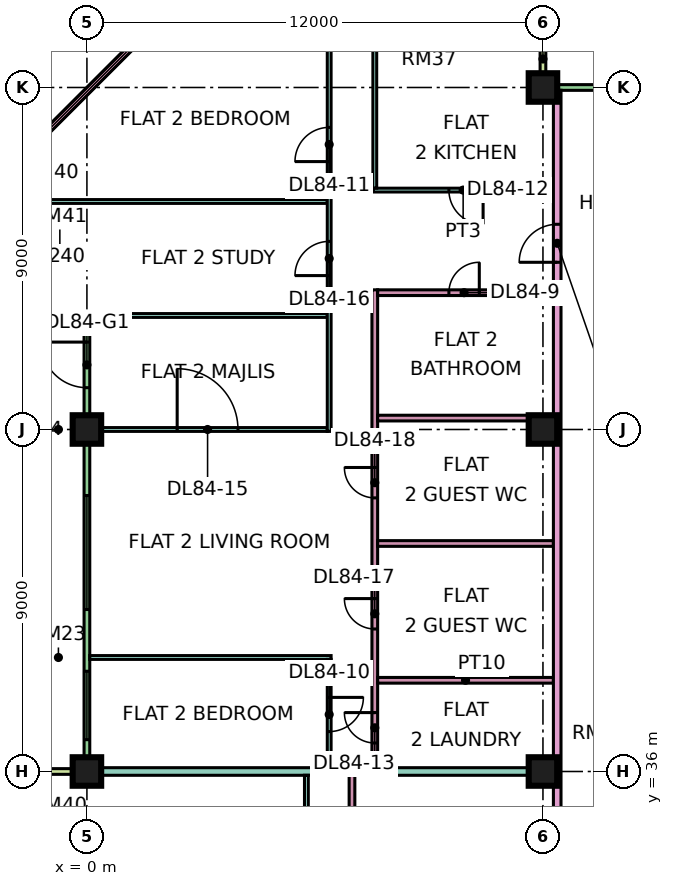
"""IFC4 building model, lengths in metres.
Left out: names, types, materials, properties, quantities, classifications, styles, units other than length and angle.
Written with IfcOpenShell. Run it as: python <this file> out.ifc"""

import sys

from ifc_helpers import new_model, si_unit, direction, frame, frame_2d, origin, origin_2d, place, context, subcontext, project, spatial, rectangle, extrude, element, fill, save


model = new_model("IFC4")
c1 = context("Model", 3, precision=1e-05, world=origin(), true_north=direction((0.0, 1.0)))
c2 = subcontext(c1, "Body", "Model", "MODEL_VIEW")
j1 = project(units=[si_unit("LENGTHUNIT", "METRE"), si_unit("PLANEANGLEUNIT", "RADIAN")], contexts=[c1])
p1 = place(None, origin())
s1 = spatial("IfcSite", under=j1, at=p1, CompositionType="ELEMENT")
p2 = place(p1, origin())
s2 = spatial("IfcBuilding", under=s1, at=p2, CompositionType="ELEMENT")
p3 = place(p2, frame((0.0, 0.0, 361.4)))
s3 = spatial("IfcBuildingStorey", under=s2, at=p3, CompositionType="ELEMENT", Elevation=361.4)
p4 = place(p3, frame((0.0, 36.0, 0.0), z_axis=(0.0, 0.0, 1.0), x_axis=(1.0, 0.0, 0.0)))
e1 = element("IfcColumn", 1, at=p4, inside=s3, PredefinedType="COLUMN", context=c2, shape_type="SweptSolid", body=[
    extrude(rectangle(XDim=0.75, YDim=0.75, at=origin_2d()), origin(), (0.0, 0.0, 1.0), 3.75),
])
for number, where, z_axis, x_axis in (
    (2, (0.0, 45.0, 0.0), (0.0, 0.0, 1.0), (1.0, 0.0, 0.0)),
    (3, (12.0, 36.0, 0.0), (0.0, 0.0, 1.0), (1.0, 0.0, 0.0)),
    (4, (12.0, 45.0, 0.0), (0.0, 0.0, 1.0), (1.0, 0.0, 0.0)),
    (5, (12.0, 54.0, 0.0), (0.0, 0.0, 1.0), (1.0, 0.0, 0.0)),
):
    element("IfcColumn", number, at=place(p3, frame(where, z_axis=z_axis, x_axis=x_axis)), inside=s3, PredefinedType="COLUMN", context=c2, shape_type="SweptSolid", body=[
        extrude(rectangle(XDim=0.75, YDim=0.75, at=origin_2d()), origin(), (0.0, 0.0, 1.0), 3.75),
    ])
p5 = place(p3, frame((22.425, 54.0, 0.0), z_axis=(0.0, 0.0, 1.0), x_axis=(-1.0, 0.0, 0.0)))
e6 = element("IfcWall", 6, at=p5, inside=s3, PredefinedType="SOLIDWALL", context=c2, shape_type="SweptSolid", body=[
    extrude(rectangle(XDim=10.35, YDim=0.15, at=frame_2d((5.175, 0.0))), origin(), (0.0, 0.0, 1.0), 3.35),
])
p6 = place(p5, frame((1.012, 0.0, 0.45)))
e7 = element("IfcOpeningElement", 7, at=p6, cuts=e6, PredefinedType="OPENING", context=c2, shape_type="SweptSolid", body=[
    extrude(rectangle(XDim=4.8, YDim=2.4, at=frame_2d((2.4, 1.2))), frame((0.0, 0.085, 0.0), z_axis=(0.0, -1.0, 0.0), x_axis=(1.0, 0.0, 0.0)), (0.0, 0.0, 1.0), 0.17),
])
p7 = place(p3, frame((12.0, 55.5, 0.0), z_axis=(0.0, 0.0, 1.0), x_axis=(0.0, -1.0, 0.0)))
e8 = element("IfcWall", 8, at=p7, inside=s3, PredefinedType="SOLIDWALL", context=c2, shape_type="SweptSolid", body=[
    extrude(rectangle(XDim=1.5, YDim=0.15, at=frame_2d((0.75, 0.0))), origin(), (0.0, 0.0, 1.0), 3.35),
])
p8 = place(p3, frame((1.553, 55.447, 0.0), z_axis=(0.0, 0.0, 1.0), x_axis=(-0.707106781187, -0.707106781187, 0.0)))
e9 = element("IfcWall", 9, at=p8, inside=s3, PredefinedType="SOLIDWALL", context=c2, shape_type="SweptSolid", body=[
    extrude(rectangle(XDim=4.243, YDim=0.15, at=frame_2d((2.121, 0.0))), origin(), (0.0, 0.0, 1.0), 3.35),
])
p9 = place(p8, frame((0.621, 0.0, 0.45)))
e10 = element("IfcOpeningElement", 10, at=p9, cuts=e9, PredefinedType="OPENING", context=c2, shape_type="SweptSolid", body=[
    extrude(rectangle(XDim=3.0, YDim=2.4, at=frame_2d((1.5, 1.2))), frame((0.0, 0.085, 0.0), z_axis=(0.0, -1.0, 0.0), x_axis=(1.0, 0.0, 0.0)), (0.0, 0.0, 1.0), 0.17),
])
p10 = place(p3, frame((0.0, 47.925, 0.0), z_axis=(0.0, 0.0, 1.0), x_axis=(0.0, -1.0, 0.0)))
e11 = element("IfcWall", 11, at=p10, inside=s3, PredefinedType="SOLIDWALL", context=c2, shape_type="SweptSolid", body=[
    extrude(rectangle(XDim=11.85, YDim=0.15, at=frame_2d((5.925, 0.0))), origin(), (0.0, 0.0, 1.0), 3.35),
])
p11 = place(p10, frame((0.625, 0.0, 0.0)))
e12 = element("IfcOpeningElement", 12, at=p11, cuts=e11, PredefinedType="OPENING", context=c2, shape_type="SweptSolid", body=[
    extrude(rectangle(XDim=1.2, YDim=2.4, at=frame_2d((0.6, 1.2))), frame((0.0, 0.085, 0.0), z_axis=(0.0, -1.0, 0.0), x_axis=(1.0, 0.0, 0.0)), (0.0, 0.0, 1.0), 0.17),
])
p12 = place(p10, frame((4.663, 0.0, 0.45)))
e13 = element("IfcOpeningElement", 13, at=p12, cuts=e11, PredefinedType="OPENING", context=c2, shape_type="SweptSolid", body=[
    extrude(rectangle(XDim=3.0, YDim=2.4, at=frame_2d((1.5, 1.2))), frame((0.0, 0.085, 0.0), z_axis=(0.0, -1.0, 0.0), x_axis=(1.0, 0.0, 0.0)), (0.0, 0.0, 1.0), 0.17),
])
p13 = place(p10, frame((9.288, 0.0, 0.45)))
e14 = element("IfcOpeningElement", 14, at=p13, cuts=e11, PredefinedType="OPENING", context=c2, shape_type="SweptSolid", body=[
    extrude(rectangle(XDim=1.8, YDim=2.4, at=frame_2d((0.9, 1.2))), frame((0.0, 0.085, 0.0), z_axis=(0.0, -1.0, 0.0), x_axis=(1.0, 0.0, 0.0)), (0.0, 0.0, 1.0), 0.17),
])
for number, where, z_axis, x_axis in (
    (15, (-1.5, 48.0, 0.0), (0.0, 0.0, 1.0), (1.0, 0.0, 0.0)),
    (16, (-1.5, 36.0, 0.0), (0.0, 0.0, 1.0), (1.0, 0.0, 0.0)),
):
    element("IfcWall", number, at=place(p3, frame(where, z_axis=z_axis, x_axis=x_axis)), inside=s3, PredefinedType="SOLIDWALL", context=c2, shape_type="SweptSolid", body=[
        extrude(rectangle(XDim=1.5, YDim=0.15, at=frame_2d((0.75, 0.0))), origin(), (0.0, 0.0, 1.0), 3.35),
    ])
e17 = element("IfcWall", 17, at=p4, inside=s3, PredefinedType="PARTITIONING", context=c2, shape_type="SweptSolid", body=[
    extrude(rectangle(XDim=12.275, YDim=0.2, at=frame_2d((6.137, 0.0))), origin(), (0.0, 0.0, 1.0), 3.35),
])
p14 = place(p3, frame((0.0, 48.0, 0.0), z_axis=(0.0, 0.0, 1.0), x_axis=(1.0, 0.0, 0.0)))
e18 = element("IfcWall", 18, at=p14, inside=s3, PredefinedType="PARTITIONING", context=c2, shape_type="SweptSolid", body=[
    extrude(rectangle(XDim=6.325, YDim=0.1, at=frame_2d((3.163, 0.0))), origin(), (0.0, 0.0, 1.0), 3.35),
])
p15 = place(p3, frame((-1.35, 51.0, 0.0), z_axis=(0.0, 0.0, 1.0), x_axis=(1.0, 0.0, 0.0)))
e19 = element("IfcWall", 19, at=p15, inside=s3, PredefinedType="PARTITIONING", context=c2, shape_type="SweptSolid", body=[
    extrude(rectangle(XDim=7.675, YDim=0.1, at=frame_2d((3.837, 0.0))), origin(), (0.0, 0.0, 1.0), 3.35),
])
p16 = place(p3, frame((0.074, 39.0, 0.0), z_axis=(0.0, 0.0, 1.0), x_axis=(1.0, 0.0, 0.0)))
e20 = element("IfcWall", 20, at=p16, inside=s3, PredefinedType="PARTITIONING", context=c2, shape_type="SweptSolid", body=[
    extrude(rectangle(XDim=6.351, YDim=0.1, at=frame_2d((3.176, 0.0))), origin(), (0.0, 0.0, 1.0), 3.35),
])
p17 = place(p3, frame((0.074, 45.0, 0.0), z_axis=(0.0, 0.0, 1.0), x_axis=(1.0, 0.0, 0.0)))
e21 = element("IfcWall", 21, at=p17, inside=s3, PredefinedType="PARTITIONING", context=c2, shape_type="SweptSolid", body=[
    extrude(rectangle(XDim=6.251, YDim=0.1, at=frame_2d((3.125, 0.0))), origin(), (0.0, 0.0, 1.0), 3.35),
])
p18 = place(p17, frame((2.301, 0.0, 0.0)))
e22 = element("IfcOpeningElement", 22, at=p18, cuts=e21, PredefinedType="OPENING", context=c2, shape_type="SweptSolid", body=[
    extrude(rectangle(XDim=1.6, YDim=2.1, at=frame_2d((0.8, 1.05))), frame((0.0, 0.06, 0.0), z_axis=(0.0, -1.0, 0.0), x_axis=(1.0, 0.0, 0.0)), (0.0, 0.0, 1.0), 0.12),
])
p19 = place(p3, frame((5.775, 29.95, 0.0), z_axis=(0.0, 0.0, 1.0), x_axis=(0.0, 1.0, 0.0)))
e23 = element("IfcWall", 23, at=p19, inside=s3, PredefinedType="PARTITIONING", context=c2, shape_type="SweptSolid", body=[
    extrude(rectangle(XDim=5.95, YDim=0.1, at=frame_2d((2.975, 0.0))), origin(), (0.0, 0.0, 1.0), 3.35),
])
p20 = place(p19, frame((1.1, 0.0, 0.0)))
e24 = element("IfcOpeningElement", 24, at=p20, cuts=e23, PredefinedType="OPENING", context=c2, shape_type="SweptSolid", body=[
    extrude(rectangle(XDim=0.9, YDim=2.1, at=frame_2d((0.45, 1.05))), frame((0.0, 0.06, 0.0), z_axis=(0.0, -1.0, 0.0), x_axis=(1.0, 0.0, 0.0)), (0.0, 0.0, 1.0), 0.12),
])
p21 = place(p19, frame((4.1, 0.0, 0.0)))
e25 = element("IfcOpeningElement", 25, at=p21, cuts=e23, PredefinedType="OPENING", context=c2, shape_type="SweptSolid", body=[
    extrude(rectangle(XDim=0.9, YDim=2.1, at=frame_2d((0.45, 1.05))), frame((0.0, 0.06, 0.0), z_axis=(0.0, -1.0, 0.0), x_axis=(1.0, 0.0, 0.0)), (0.0, 0.0, 1.0), 0.12),
])
p22 = place(p3, frame((6.375, 36.1, 0.0), z_axis=(0.0, 0.0, 1.0), x_axis=(0.0, 1.0, 0.0)))
e26 = element("IfcWall", 26, at=p22, inside=s3, PredefinedType="PARTITIONING", context=c2, shape_type="SweptSolid", body=[
    extrude(rectangle(XDim=2.85, YDim=0.1, at=frame_2d((1.425, 0.0))), origin(), (0.0, 0.0, 1.0), 3.35),
])
p23 = place(p22, frame((0.95, 0.0, 0.0)))
e27 = element("IfcOpeningElement", 27, at=p23, cuts=e26, PredefinedType="OPENING", context=c2, shape_type="SweptSolid", body=[
    extrude(rectangle(XDim=0.9, YDim=2.1, at=frame_2d((0.45, 1.05))), frame((0.0, 0.06, 0.0), z_axis=(0.0, -1.0, 0.0), x_axis=(1.0, 0.0, 0.0)), (0.0, 0.0, 1.0), 0.12),
])
p24 = place(p3, frame((6.375, 44.95, 0.0), z_axis=(0.0, 0.0, 1.0), x_axis=(0.0, 1.0, 0.0)))
e28 = element("IfcWall", 28, at=p24, inside=s3, PredefinedType="PARTITIONING", context=c2, shape_type="SweptSolid", body=[
    extrude(rectangle(XDim=10.4, YDim=0.1, at=frame_2d((5.2, 0.0))), origin(), (0.0, 0.0, 1.0), 3.35),
])
p25 = place(p24, frame((7.1, 0.0, 0.0)))
e29 = element("IfcOpeningElement", 29, at=p25, cuts=e28, PredefinedType="OPENING", context=c2, shape_type="SweptSolid", body=[
    extrude(rectangle(XDim=0.9, YDim=2.1, at=frame_2d((0.45, 1.05))), frame((0.0, 0.06, 0.0), z_axis=(0.0, -1.0, 0.0), x_axis=(1.0, 0.0, 0.0)), (0.0, 0.0, 1.0), 0.12),
])
p26 = place(p24, frame((4.1, 0.0, 0.0)))
e30 = element("IfcOpeningElement", 30, at=p26, cuts=e28, PredefinedType="OPENING", context=c2, shape_type="SweptSolid", body=[
    extrude(rectangle(XDim=0.9, YDim=2.1, at=frame_2d((0.45, 1.05))), frame((0.0, 0.06, 0.0), z_axis=(0.0, -1.0, 0.0), x_axis=(1.0, 0.0, 0.0)), (0.0, 0.0, 1.0), 0.12),
])
p27 = place(p3, frame((6.975, 26.325, 0.0), z_axis=(0.0, 0.0, 1.0), x_axis=(0.0, 1.0, 0.0)))
e31 = element("IfcWall", 31, at=p27, inside=s3, PredefinedType="PARTITIONING", context=c2, shape_type="SweptSolid", body=[
    extrude(rectangle(XDim=9.575, YDim=0.15, at=frame_2d((4.788, 0.0))), origin(), (0.0, 0.0, 1.0), 3.35),
])
p28 = place(p27, frame((1.125, 0.0, 0.0)))
e32 = element("IfcOpeningElement", 32, at=p28, cuts=e31, PredefinedType="OPENING", context=c2, shape_type="SweptSolid", body=[
    extrude(rectangle(XDim=0.8, YDim=2.1, at=frame_2d((0.4, 1.05))), frame((0.0, 0.085, 0.0), z_axis=(0.0, -1.0, 0.0), x_axis=(1.0, 0.0, 0.0)), (0.0, 0.0, 1.0), 0.17),
])
p29 = place(p27, frame((5.925, 0.0, 0.0)))
e33 = element("IfcOpeningElement", 33, at=p29, cuts=e31, PredefinedType="OPENING", context=c2, shape_type="SweptSolid", body=[
    extrude(rectangle(XDim=0.9, YDim=2.1, at=frame_2d((0.45, 1.05))), frame((0.0, 0.085, 0.0), z_axis=(0.0, -1.0, 0.0), x_axis=(1.0, 0.0, 0.0)), (0.0, 0.0, 1.0), 0.17),
])
p30 = place(p3, frame((7.525, 51.3, 0.0), z_axis=(0.0, 0.0, 1.0), x_axis=(1.0, 0.0, 0.0)))
e34 = element("IfcWall", 34, at=p30, inside=s3, PredefinedType="PARTITIONING", context=c2, shape_type="SweptSolid", body=[
    extrude(rectangle(XDim=4.75, YDim=0.1, at=frame_2d((2.375, 0.0))), origin(), (0.0, 0.0, 1.0), 3.35),
])
p31 = place(p30, frame((2.0, 0.0, 0.0)))
e35 = element("IfcOpeningElement", 35, at=p31, cuts=e34, PredefinedType="OPENING", context=c2, shape_type="SweptSolid", body=[
    extrude(rectangle(XDim=0.9, YDim=2.1, at=frame_2d((0.45, 1.05))), frame((0.0, 0.06, 0.0), z_axis=(0.0, -1.0, 0.0), x_axis=(1.0, 0.0, 0.0)), (0.0, 0.0, 1.0), 0.12),
])
p32 = place(p3, frame((7.575, 36.1, 0.0), z_axis=(0.0, 0.0, 1.0), x_axis=(0.0, 1.0, 0.0)))
e36 = element("IfcWall", 36, at=p32, inside=s3, PredefinedType="PARTITIONING", context=c2, shape_type="SweptSolid", body=[
    extrude(rectangle(XDim=12.575, YDim=0.15, at=frame_2d((6.288, 0.0))), origin(), (0.0, 0.0, 1.0), 3.35),
])
p33 = place(p32, frame((0.65, 0.0, 0.0)))
e37 = element("IfcOpeningElement", 37, at=p33, cuts=e36, PredefinedType="OPENING", context=c2, shape_type="SweptSolid", body=[
    extrude(rectangle(XDim=0.8, YDim=2.1, at=frame_2d((0.4, 1.05))), frame((0.0, 0.085, 0.0), z_axis=(0.0, -1.0, 0.0), x_axis=(1.0, 0.0, 0.0)), (0.0, 0.0, 1.0), 0.17),
])
p34 = place(p32, frame((3.65, 0.0, 0.0)))
e38 = element("IfcOpeningElement", 38, at=p34, cuts=e36, PredefinedType="OPENING", context=c2, shape_type="SweptSolid", body=[
    extrude(rectangle(XDim=0.8, YDim=2.1, at=frame_2d((0.4, 1.05))), frame((0.0, 0.085, 0.0), z_axis=(0.0, -1.0, 0.0), x_axis=(1.0, 0.0, 0.0)), (0.0, 0.0, 1.0), 0.17),
])
p35 = place(p32, frame((7.1, 0.0, 0.0)))
e39 = element("IfcOpeningElement", 39, at=p35, cuts=e36, PredefinedType="OPENING", context=c2, shape_type="SweptSolid", body=[
    extrude(rectangle(XDim=0.8, YDim=2.1, at=frame_2d((0.4, 1.05))), frame((0.0, 0.085, 0.0), z_axis=(0.0, -1.0, 0.0), x_axis=(1.0, 0.0, 0.0)), (0.0, 0.0, 1.0), 0.17),
])
p36 = place(p3, frame((7.575, 51.35, 0.0), z_axis=(0.0, 0.0, 1.0), x_axis=(0.0, 1.0, 0.0)))
e40 = element("IfcWall", 40, at=p36, inside=s3, PredefinedType="PARTITIONING", context=c2, shape_type="SweptSolid", body=[
    extrude(rectangle(XDim=4.0, YDim=0.1, at=frame_2d((2.0, 0.0))), origin(), (0.0, 0.0, 1.0), 3.35),
])
for number, where, z_axis, x_axis in (
    (41, (7.65, 38.4, 0.0), (0.0, 0.0, 1.0), (1.0, 0.0, 0.0)),
    (42, (7.65, 42.0, 0.0), (0.0, 0.0, 1.0), (1.0, 0.0, 0.0)),
    (43, (7.65, 45.3, 0.0), (0.0, 0.0, 1.0), (1.0, 0.0, 0.0)),
):
    element("IfcWall", number, at=place(p3, frame(where, z_axis=z_axis, x_axis=x_axis)), inside=s3, PredefinedType="PARTITIONING", context=c2, shape_type="SweptSolid", body=[
        extrude(rectangle(XDim=4.625, YDim=0.15, at=frame_2d((2.312, 0.0))), origin(), (0.0, 0.0, 1.0), 3.35),
    ])
p37 = place(p3, frame((7.65, 48.6, 0.0), z_axis=(0.0, 0.0, 1.0), x_axis=(1.0, 0.0, 0.0)))
e44 = element("IfcWall", 44, at=p37, inside=s3, PredefinedType="PARTITIONING", context=c2, shape_type="SweptSolid", body=[
    extrude(rectangle(XDim=4.625, YDim=0.15, at=frame_2d((2.312, 0.0))), origin(), (0.0, 0.0, 1.0), 3.35),
])
p38 = place(p37, frame((1.875, 0.0, 0.0)))
e45 = element("IfcOpeningElement", 45, at=p38, cuts=e44, PredefinedType="OPENING", context=c2, shape_type="SweptSolid", body=[
    extrude(rectangle(XDim=0.8, YDim=2.1, at=frame_2d((0.4, 1.05))), frame((0.0, 0.085, 0.0), z_axis=(0.0, -1.0, 0.0), x_axis=(1.0, 0.0, 0.0)), (0.0, 0.0, 1.0), 0.17),
])
p39 = place(p3, frame((12.375, 20.0, 0.0), z_axis=(0.0, 0.0, 1.0), x_axis=(0.0, 1.0, 0.0)))
e46 = element("IfcWall", 46, at=p39, inside=s3, PredefinedType="PARTITIONING", context=c2, shape_type="SweptSolid", body=[
    extrude(rectangle(XDim=33.926, YDim=0.2, at=frame_2d((16.963, 0.0))), origin(), (0.0, 0.0, 1.0), 3.35),
])
p40 = place(p39, frame((29.4, 0.0, 0.0)))
e47 = element("IfcOpeningElement", 47, at=p40, cuts=e46, PredefinedType="OPENING", context=c2, shape_type="SweptSolid", body=[
    extrude(rectangle(XDim=1.0, YDim=2.1, at=frame_2d((0.5, 1.05))), frame((0.0, 0.11, 0.0), z_axis=(0.0, -1.0, 0.0), x_axis=(1.0, 0.0, 0.0)), (0.0, 0.0, 1.0), 0.22),
])
p41 = place(p39, frame((0.6, 0.0, 0.0)))
e48 = element("IfcOpeningElement", 48, at=p41, cuts=e46, PredefinedType="OPENING", context=c2, shape_type="SweptSolid", body=[
    extrude(rectangle(XDim=1.2, YDim=2.1, at=frame_2d((0.6, 1.05))), frame((0.0, 0.11, 0.0), z_axis=(0.0, -1.0, 0.0), x_axis=(1.0, 0.0, 0.0)), (0.0, 0.0, 1.0), 0.22),
])
p42 = place(p39, frame((4.5, 0.0, 0.0)))
e49 = element("IfcOpeningElement", 49, at=p42, cuts=e46, PredefinedType="OPENING", context=c2, shape_type="SweptSolid", body=[
    extrude(rectangle(XDim=1.0, YDim=2.1, at=frame_2d((0.5, 1.05))), frame((0.0, 0.11, 0.0), z_axis=(0.0, -1.0, 0.0), x_axis=(1.0, 0.0, 0.0)), (0.0, 0.0, 1.0), 0.22),
])
p43 = place(p9, origin())
e50 = element("IfcWindow", 50, at=p43, inside=s3, PartitioningType="SINGLE_PANEL", PredefinedType="WINDOW", context=c2, shape_type="SweptSolid", body=[
    extrude(rectangle(XDim=3.0, YDim=2.4, at=frame_2d((1.5, 1.2))), frame((0.0, 0.03, 0.0), z_axis=(0.0, -1.0, 0.0), x_axis=(1.0, 0.0, 0.0)), (0.0, 0.0, 1.0), 0.06),
])
fill(e10, e50)
p44 = place(p11, frame((1.2, 0.0, 0.0), z_axis=(0.0, 0.0, 1.0), x_axis=(-1.0, 0.0, 0.0)))
e51 = element("IfcDoor", 51, at=p44, inside=s3, OperationType="DOUBLE_DOOR_SINGLE_SWING", PredefinedType="DOOR", context=c2, shape_type="SweptSolid", body=[
    extrude(rectangle(XDim=1.2, YDim=2.4, at=frame_2d((0.6, 1.2))), frame((0.0, 0.025, 0.0), z_axis=(0.0, -1.0, 0.0), x_axis=(1.0, 0.0, 0.0)), (0.0, 0.0, 1.0), 0.05),
])
fill(e12, e51)
p45 = place(p12, origin())
e52 = element("IfcWindow", 52, at=p45, inside=s3, PartitioningType="SINGLE_PANEL", PredefinedType="WINDOW", context=c2, shape_type="SweptSolid", body=[
    extrude(rectangle(XDim=3.0, YDim=2.4, at=frame_2d((1.5, 1.2))), frame((0.0, 0.03, 0.0), z_axis=(0.0, -1.0, 0.0), x_axis=(1.0, 0.0, 0.0)), (0.0, 0.0, 1.0), 0.06),
])
fill(e13, e52)
p46 = place(p13, origin())
e53 = element("IfcWindow", 53, at=p46, inside=s3, PartitioningType="SINGLE_PANEL", PredefinedType="WINDOW", context=c2, shape_type="SweptSolid", body=[
    extrude(rectangle(XDim=1.8, YDim=2.4, at=frame_2d((0.9, 1.2))), frame((0.0, 0.03, 0.0), z_axis=(0.0, -1.0, 0.0), x_axis=(1.0, 0.0, 0.0)), (0.0, 0.0, 1.0), 0.06),
])
fill(e14, e53)
p47 = place(p38, frame((0.8, 0.0, 0.0), z_axis=(0.0, 0.0, 1.0), x_axis=(-1.0, 0.0, 0.0)))
e54 = element("IfcDoor", 54, at=p47, inside=s3, OperationType="SINGLE_SWING_RIGHT", PredefinedType="DOOR", context=c2, shape_type="SweptSolid", body=[
    extrude(rectangle(XDim=0.8, YDim=2.1, at=frame_2d((0.4, 1.05))), frame((0.0, 0.025, 0.0), z_axis=(0.0, -1.0, 0.0), x_axis=(1.0, 0.0, 0.0)), (0.0, 0.0, 1.0), 0.05),
])
fill(e45, e54)
p48 = place(p23, origin())
e55 = element("IfcDoor", 55, at=p48, inside=s3, OperationType="SINGLE_SWING_RIGHT", PredefinedType="DOOR", context=c2, shape_type="SweptSolid", body=[
    extrude(rectangle(XDim=0.9, YDim=2.1, at=frame_2d((0.45, 1.05))), frame((0.0, 0.025, 0.0), z_axis=(0.0, -1.0, 0.0), x_axis=(1.0, 0.0, 0.0)), (0.0, 0.0, 1.0), 0.05),
])
fill(e27, e55)
p49 = place(p25, origin())
e56 = element("IfcDoor", 56, at=p49, inside=s3, OperationType="SINGLE_SWING_LEFT", PredefinedType="DOOR", context=c2, shape_type="SweptSolid", body=[
    extrude(rectangle(XDim=0.9, YDim=2.1, at=frame_2d((0.45, 1.05))), frame((0.0, 0.025, 0.0), z_axis=(0.0, -1.0, 0.0), x_axis=(1.0, 0.0, 0.0)), (0.0, 0.0, 1.0), 0.05),
])
fill(e29, e56)
p50 = place(p31, origin())
e57 = element("IfcDoor", 57, at=p50, inside=s3, OperationType="SINGLE_SWING_RIGHT", PredefinedType="DOOR", context=c2, shape_type="SweptSolid", body=[
    extrude(rectangle(XDim=0.9, YDim=2.1, at=frame_2d((0.45, 1.05))), frame((0.0, 0.025, 0.0), z_axis=(0.0, -1.0, 0.0), x_axis=(1.0, 0.0, 0.0)), (0.0, 0.0, 1.0), 0.05),
])
fill(e35, e57)
p51 = place(p33, frame((0.8, 0.0, 0.0), z_axis=(0.0, 0.0, 1.0), x_axis=(-1.0, 0.0, 0.0)))
e58 = element("IfcDoor", 58, at=p51, inside=s3, OperationType="SINGLE_SWING_RIGHT", PredefinedType="DOOR", context=c2, shape_type="SweptSolid", body=[
    extrude(rectangle(XDim=0.8, YDim=2.1, at=frame_2d((0.4, 1.05))), frame((0.0, 0.025, 0.0), z_axis=(0.0, -1.0, 0.0), x_axis=(1.0, 0.0, 0.0)), (0.0, 0.0, 1.0), 0.05),
])
fill(e37, e58)
p52 = place(p40, origin())
e59 = element("IfcDoor", 59, at=p52, inside=s3, OperationType="SINGLE_SWING_LEFT", PredefinedType="DOOR", context=c2, shape_type="SweptSolid", body=[
    extrude(rectangle(XDim=1.0, YDim=2.1, at=frame_2d((0.5, 1.05))), frame((0.0, 0.025, 0.0), z_axis=(0.0, -1.0, 0.0), x_axis=(1.0, 0.0, 0.0)), (0.0, 0.0, 1.0), 0.05),
])
fill(e47, e59)
p53 = place(p18, origin())
e60 = element("IfcDoor", 60, at=p53, inside=s3, OperationType="DOUBLE_DOOR_SINGLE_SWING", PredefinedType="DOOR", context=c2, shape_type="SweptSolid", body=[
    extrude(rectangle(XDim=1.6, YDim=2.1, at=frame_2d((0.8, 1.05))), frame((0.0, 0.025, 0.0), z_axis=(0.0, -1.0, 0.0), x_axis=(1.0, 0.0, 0.0)), (0.0, 0.0, 1.0), 0.05),
])
fill(e22, e60)
p54 = place(p26, origin())
e61 = element("IfcDoor", 61, at=p54, inside=s3, OperationType="SINGLE_SWING_LEFT", PredefinedType="DOOR", context=c2, shape_type="SweptSolid", body=[
    extrude(rectangle(XDim=0.9, YDim=2.1, at=frame_2d((0.45, 1.05))), frame((0.0, 0.025, 0.0), z_axis=(0.0, -1.0, 0.0), x_axis=(1.0, 0.0, 0.0)), (0.0, 0.0, 1.0), 0.05),
])
fill(e30, e61)
p55 = place(p34, frame((0.8, 0.0, 0.0), z_axis=(0.0, 0.0, 1.0), x_axis=(-1.0, 0.0, 0.0)))
e62 = element("IfcDoor", 62, at=p55, inside=s3, OperationType="SINGLE_SWING_RIGHT", PredefinedType="DOOR", context=c2, shape_type="SweptSolid", body=[
    extrude(rectangle(XDim=0.8, YDim=2.1, at=frame_2d((0.4, 1.05))), frame((0.0, 0.025, 0.0), z_axis=(0.0, -1.0, 0.0), x_axis=(1.0, 0.0, 0.0)), (0.0, 0.0, 1.0), 0.05),
])
fill(e38, e62)
p56 = place(p35, frame((0.8, 0.0, 0.0), z_axis=(0.0, 0.0, 1.0), x_axis=(-1.0, 0.0, 0.0)))
e63 = element("IfcDoor", 63, at=p56, inside=s3, OperationType="SINGLE_SWING_RIGHT", PredefinedType="DOOR", context=c2, shape_type="SweptSolid", body=[
    extrude(rectangle(XDim=0.8, YDim=2.1, at=frame_2d((0.4, 1.05))), frame((0.0, 0.025, 0.0), z_axis=(0.0, -1.0, 0.0), x_axis=(1.0, 0.0, 0.0)), (0.0, 0.0, 1.0), 0.05),
])
fill(e39, e63)
save(model, sys.argv[1])
